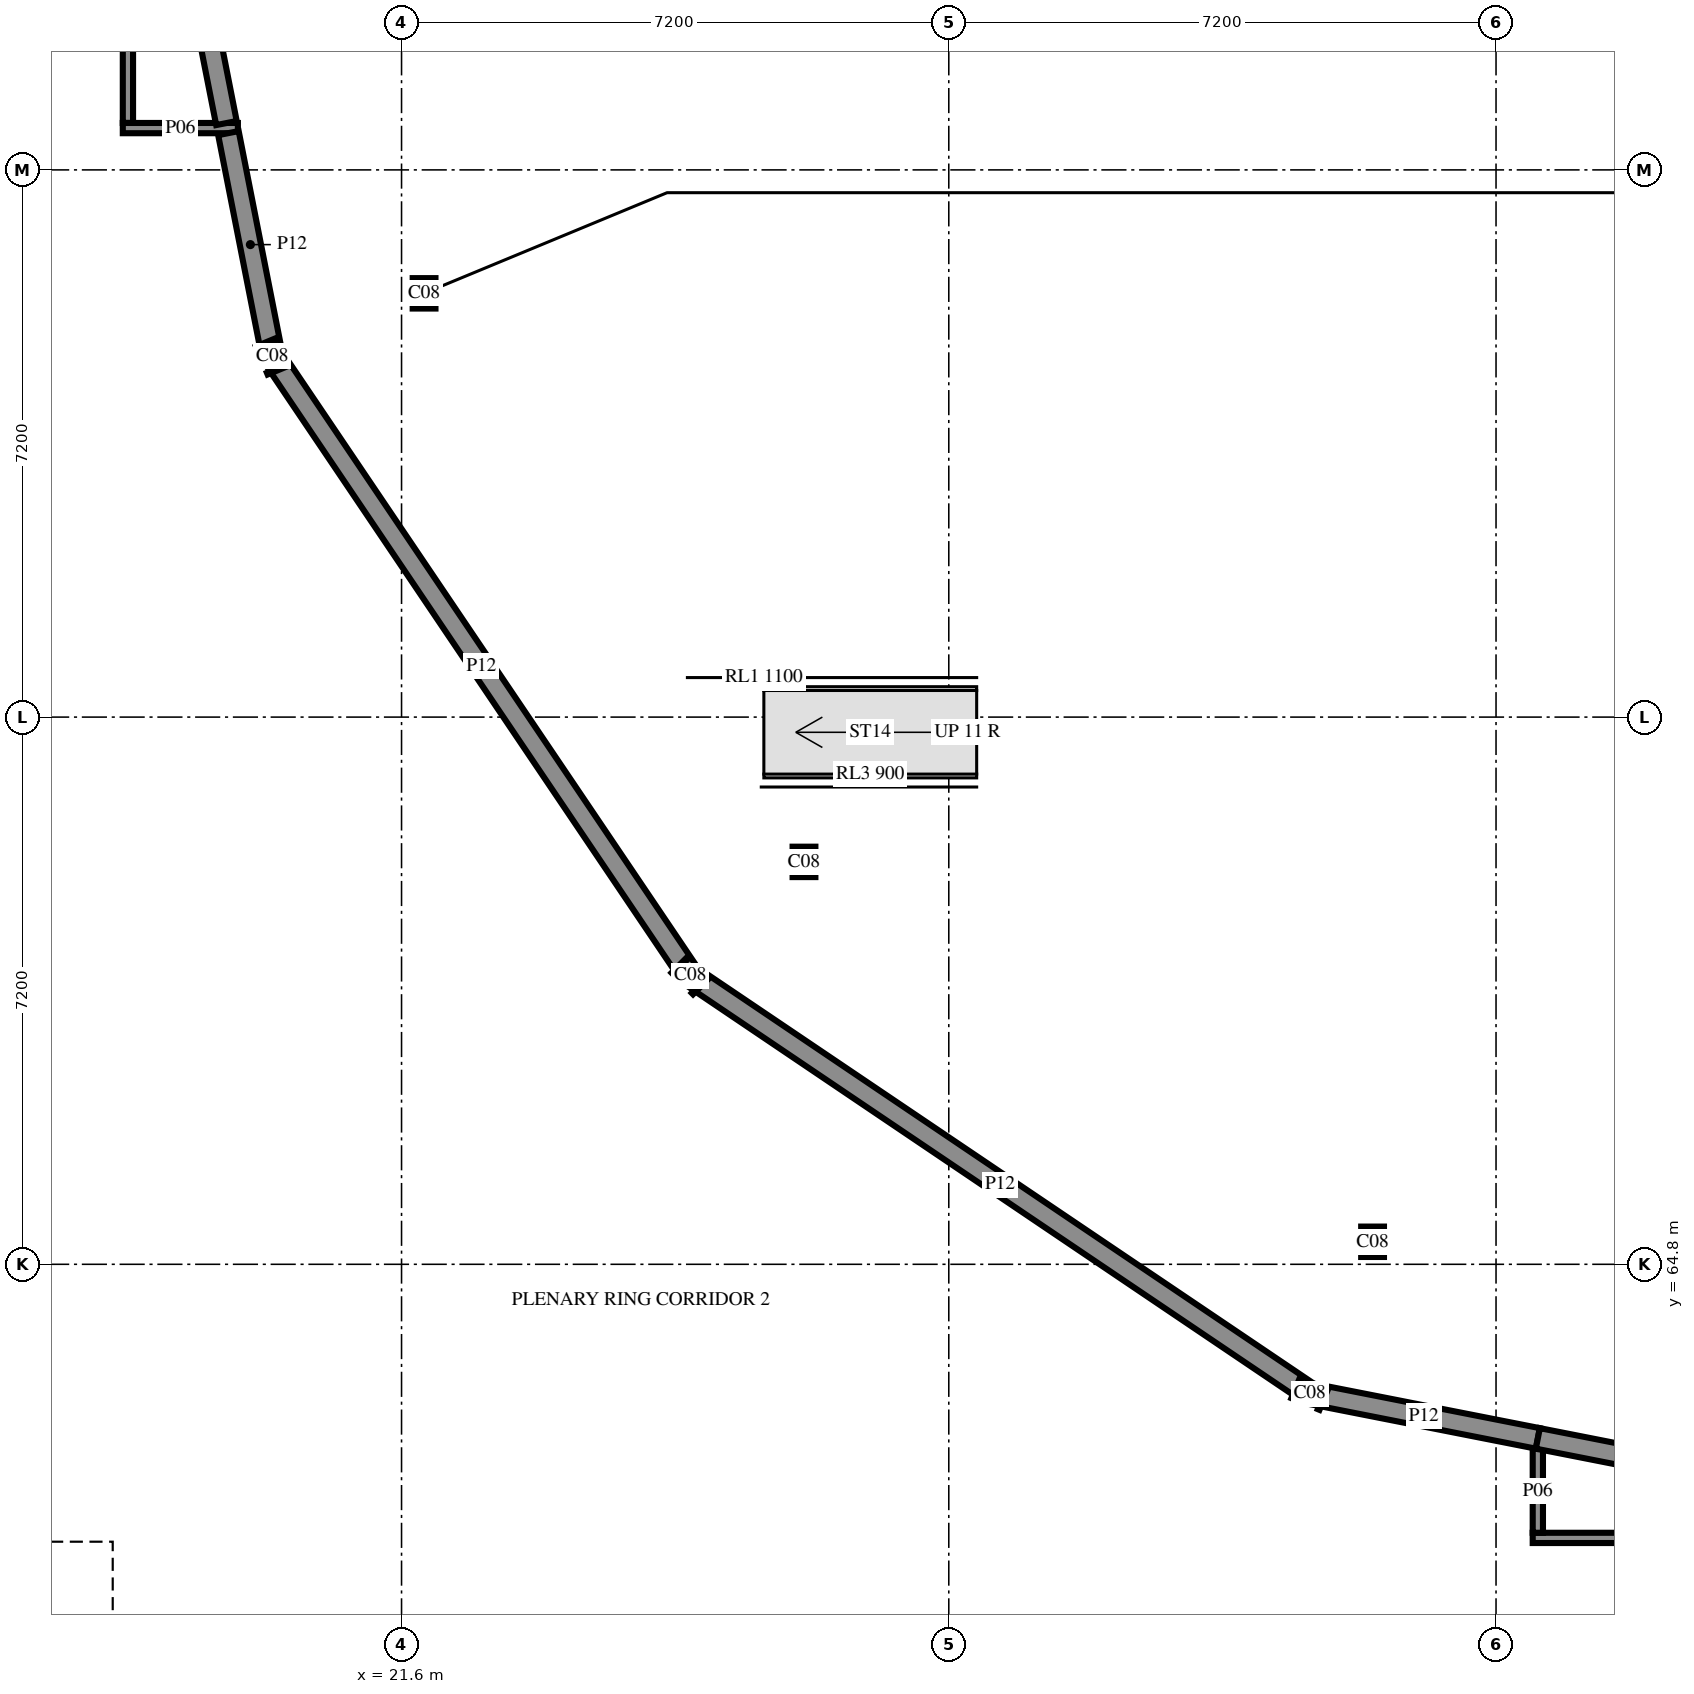
"""IFC4 building model, lengths in metres.
Left out: names, types, materials, properties, quantities, classifications, styles, units other than length and angle.
Written with IfcOpenShell. Run it as: python <this file> out.ifc"""

import sys

from ifc_helpers import new_model, si_unit, direction, frame, frame_2d, origin, origin_2d, place, context, subcontext, project, spatial, rectangle, i_section, extrude, element, fill, save


model = new_model("IFC4")
c1 = context("Model", 3, precision=1e-05, world=origin(), true_north=direction((0.0, 1.0)))
c2 = subcontext(c1, "Body", "Model", "MODEL_VIEW")
j1 = project(units=[si_unit("LENGTHUNIT", "METRE"), si_unit("PLANEANGLEUNIT", "RADIAN")], contexts=[c1])
p1 = place(None, origin())
s1 = spatial("IfcSite", under=j1, at=p1, CompositionType="ELEMENT")
p2 = place(p1, origin())
s2 = spatial("IfcBuilding", under=s1, at=p2, CompositionType="ELEMENT")
p3 = place(p2, frame((0.0, 0.0, 10.8)))
s3 = spatial("IfcBuildingStorey", under=s2, at=p3, CompositionType="ELEMENT", Elevation=10.8)
for number, where, z_axis, x_axis in (
    (1, (19.9, 76.75, 0.0), (0.0, 0.0, 1.0), (-0.924, -0.383, 0.0)),
    (2, (25.4, 68.6, 0.0), (0.0, 0.0, 1.0), (-0.707, -0.707, 0.0)),
    (3, (33.55, 63.1, 0.0), (0.0, 0.0, 1.0), (-0.383, -0.924, 0.0)),
):
    element("IfcColumn", number, at=place(p3, frame(where, z_axis=z_axis, x_axis=x_axis)), inside=s3, PredefinedType="COLUMN", context=c2, shape_type="SweptSolid", body=[
        extrude(i_section(OverallWidth=0.3, OverallDepth=0.4, WebThickness=0.013, FlangeThickness=0.024, FilletRadius=0.027, at=origin_2d()), origin(), (0.0, 0.0, 1.0), 3.6),
    ])
p4 = place(p3, frame((15.6, 61.1, 0.0), z_axis=(0.0, 0.0, 1.0), x_axis=(1.0, 0.0, 0.0)))
e4 = element("IfcWall", 4, at=p4, inside=s3, PredefinedType="SHEAR", context=c2, shape_type="SweptSolid", body=[
    extrude(rectangle(XDim=2.4, YDim=0.2, at=frame_2d((1.2, 0.0))), origin(), (0.0, 0.0, 1.0), 3.6),
])
p5 = place(p4, frame((0.65, 0.0, 0.0)))
e5 = element("IfcOpeningElement", 5, at=p5, cuts=e4, PredefinedType="OPENING", context=c2, shape_type="SweptSolid", body=[
    extrude(rectangle(XDim=1.1, YDim=2.1, at=frame_2d((0.55, 1.05))), frame((0.0, 0.11, 0.0), z_axis=(0.0, -1.0, 0.0), x_axis=(1.0, 0.0, 0.0)), (0.0, 0.0, 1.0), 0.22),
])
p6 = place(p3, frame((17.9, 58.8, 0.0), z_axis=(0.0, 0.0, 1.0), x_axis=(0.0, 1.0, 0.0)))
e6 = element("IfcWall", 6, at=p6, inside=s3, PredefinedType="SHEAR", context=c2, shape_type="SweptSolid", body=[
    extrude(rectangle(XDim=2.2, YDim=0.2, at=frame_2d((1.1, 0.0))), origin(), (0.0, 0.0, 1.0), 3.6),
])
p7 = place(p3, frame((18.0, 85.55, 0.0), z_axis=(0.0, 0.0, 1.0), x_axis=(0.0, -1.0, 0.0)))
e7 = element("IfcWall", 7, at=p7, inside=s3, PredefinedType="PARTITIONING", context=c2, shape_type="SweptSolid", body=[
    extrude(rectangle(XDim=5.733, YDim=0.135, at=frame_2d((2.866, 0.0))), origin(), (0.0, 0.0, 1.0), 3.42),
])
p8 = place(p3, frame((36.482, 61.2, 0.0), z_axis=(0.0, 0.0, 1.0), x_axis=(1.0, 0.0, 0.0)))
e8 = element("IfcWall", 8, at=p8, inside=s3, PredefinedType="PARTITIONING", context=c2, shape_type="SweptSolid", body=[
    extrude(rectangle(XDim=5.868, YDim=0.135, at=frame_2d((2.934, 0.0))), origin(), (0.0, 0.0, 1.0), 3.42),
])
p9 = place(p3, frame((36.55, 62.372, 0.0), z_axis=(0.0, 0.0, 1.0), x_axis=(0.0, -1.0, 0.0)))
e9 = element("IfcWall", 9, at=p9, inside=s3, PredefinedType="PARTITIONING", context=c2, shape_type="SweptSolid", body=[
    extrude(rectangle(XDim=1.104, YDim=0.135, at=frame_2d((0.552, 0.0))), origin(), (0.0, 0.0, 1.0), 3.42),
])
p10 = place(p3, frame((17.933, 79.75, 0.0), z_axis=(0.0, 0.0, 1.0), x_axis=(1.0, 0.0, 0.0)))
e10 = element("IfcWall", 10, at=p10, inside=s3, PredefinedType="PARTITIONING", context=c2, shape_type="SweptSolid", body=[
    extrude(rectangle(XDim=1.514, YDim=0.135, at=frame_2d((0.757, 0.0))), origin(), (0.0, 0.0, 1.0), 3.42),
])
p11 = place(p3, frame((33.55, 63.1, 0.0), z_axis=(0.0, 0.0, 1.0), x_axis=(0.981153778086, -0.19322852726, 0.0)))
e11 = element("IfcWall", 11, at=p11, inside=s3, PredefinedType="PARTITIONING", context=c2, shape_type="SweptSolid", body=[
    extrude(rectangle(XDim=3.058, YDim=0.275, at=frame_2d((1.529, 0.0))), origin(), (0.0, 0.0, 1.0), 3.07),
])
p12 = place(p3, frame((19.322, 79.684, 0.0), z_axis=(0.0, 0.0, 1.0), x_axis=(0.193179069745, -0.98116351696, 0.0)))
e12 = element("IfcWall", 12, at=p12, inside=s3, PredefinedType="PARTITIONING", context=c2, shape_type="SweptSolid", body=[
    extrude(rectangle(XDim=2.99, YDim=0.275, at=frame_2d((1.495, 0.0))), origin(), (0.0, 0.0, 1.0), 3.07),
])
p13 = place(p3, frame((19.9, 76.75, 0.0), z_axis=(0.0, 0.0, 1.0), x_axis=(0.559390118145, -0.828904515443, 0.0)))
e13 = element("IfcWall", 13, at=p13, inside=s3, PredefinedType="PARTITIONING", context=c2, shape_type="SweptSolid", body=[
    extrude(rectangle(XDim=9.832, YDim=0.275, at=frame_2d((4.916, 0.0))), origin(), (0.0, 0.0, 1.0), 3.07),
])
p14 = place(p3, frame((25.4, 68.6, 0.0), z_axis=(0.0, 0.0, 1.0), x_axis=(0.828912285216, -0.559378604719, 0.0)))
e14 = element("IfcWall", 14, at=p14, inside=s3, PredefinedType="PARTITIONING", context=c2, shape_type="SweptSolid", body=[
    extrude(rectangle(XDim=9.832, YDim=0.275, at=frame_2d((4.916, 0.0))), origin(), (0.0, 0.0, 1.0), 3.07),
])
p15 = place(p3, frame((36.55, 62.509, 0.0), z_axis=(0.0, 0.0, 1.0), x_axis=(0.981162344826, -0.193185022957, 0.0)))
e15 = element("IfcWall", 15, at=p15, inside=s3, PredefinedType="PARTITIONING", context=c2, shape_type="SweptSolid", body=[
    extrude(rectangle(XDim=6.778, YDim=0.275, at=frame_2d((3.389, 0.0))), origin(), (0.0, 0.0, 1.0), 3.07),
])
p16 = place(p3, frame((18.0, 86.4, 0.0), z_axis=(0.0, 0.0, 1.0), x_axis=(0.193197572226, -0.981159873867, 0.0)))
e16 = element("IfcWall", 16, at=p16, inside=s3, PredefinedType="PARTITIONING", context=c2, shape_type="SweptSolid", body=[
    extrude(rectangle(XDim=6.71, YDim=0.275, at=frame_2d((3.355, 0.0))), origin(), (0.0, 0.0, 1.0), 3.07),
])
for number, where, z_axis, x_axis in (
    (17, (21.896, 77.576, 0.0), (0.0, 0.0, 1.0), (1.0, 0.0, 0.0)),
    (18, (26.895, 70.095, 0.0), (0.0, 0.0, 1.0), (1.0, 0.0, 0.0)),
    (19, (34.376, 65.096, 0.0), (0.0, 0.0, 1.0), (1.0, 0.0, 0.0)),
):
    element("IfcColumn", number, at=place(p3, frame(where, z_axis=z_axis, x_axis=x_axis)), inside=s3, PredefinedType="COLUMN", context=c2, shape_type="SweptSolid", body=[
        extrude(i_section(OverallWidth=0.3, OverallDepth=0.4, WebThickness=0.013, FlangeThickness=0.024, FilletRadius=0.027, at=origin_2d()), origin(), (0.0, 0.0, 1.0), 3.6),
    ])
p17 = place(p5, origin())
e20 = element("IfcDoor", 20, at=p17, inside=s3, OperationType="SLIDING_TO_LEFT", PredefinedType="DOOR", context=c2, shape_type="SweptSolid", body=[
    extrude(rectangle(XDim=1.1, YDim=2.1, at=frame_2d((0.55, 1.05))), frame((0.0, 0.025, 0.0), z_axis=(0.0, -1.0, 0.0), x_axis=(1.0, 0.0, 0.0)), (0.0, 0.0, 1.0), 0.05),
])
fill(e5, e20)
save(model, sys.argv[1])
